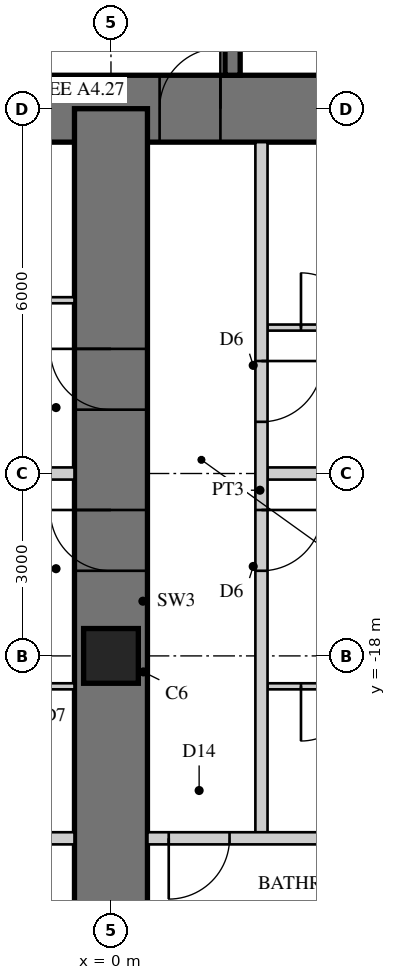
"""IFC4 building model, lengths in metres.
Left out: names, types, materials, properties, quantities, classifications, styles, units other than length and angle.
Written with IfcOpenShell. Run it as: python <this file> out.ifc"""

import sys

from ifc_helpers import new_model, si_unit, direction, frame, frame_2d, origin, origin_2d, place, context, subcontext, project, spatial, rectangle, extrude, element, fill, save


model = new_model("IFC4")
c1 = context("Model", 3, precision=1e-05, world=origin(), true_north=direction((0.0, 1.0)))
c2 = subcontext(c1, "Body", "Model", "MODEL_VIEW")
j1 = project(units=[si_unit("LENGTHUNIT", "METRE"), si_unit("PLANEANGLEUNIT", "RADIAN")], contexts=[c1])
p1 = place(None, origin())
s1 = spatial("IfcSite", under=j1, at=p1, CompositionType="ELEMENT")
p2 = place(p1, origin())
s2 = spatial("IfcBuilding", under=s1, at=p2, CompositionType="ELEMENT")
p3 = place(p2, frame((0.0, 0.0, 169.5)))
s3 = spatial("IfcBuildingStorey", under=s2, at=p3, CompositionType="ELEMENT", Elevation=169.5)
p4 = place(p3, frame((-9.0, -9.0, 0.0), z_axis=(0.0, 0.0, 1.0), x_axis=(1.0, 0.0, 0.0)))
e1 = element("IfcWall", 1, at=p4, inside=s3, PredefinedType="SHEAR", context=c2, shape_type="SweptSolid", body=[
    extrude(rectangle(XDim=18.0, YDim=1.1, at=frame_2d((9.0, 0.0))), origin(), (0.0, 0.0, 1.0), 3.4),
])
p5 = place(p4, frame((9.8, 0.0, 0.0)))
e2 = element("IfcOpeningElement", 2, at=p5, cuts=e1, PredefinedType="OPENING", context=c2, shape_type="SweptSolid", body=[
    extrude(rectangle(XDim=1.0, YDim=2.4, at=frame_2d((0.5, 1.2))), frame((0.0, 0.56, 0.0), z_axis=(0.0, -1.0, 0.0), x_axis=(1.0, 0.0, 0.0)), (0.0, 0.0, 1.0), 1.12),
])
p6 = place(p3, frame((2.0, -1.675, 0.0), z_axis=(0.0, 0.0, 1.0), x_axis=(0.0, -1.0, 0.0)))
e3 = element("IfcWall", 3, at=p6, inside=s3, PredefinedType="SHEAR", context=c2, shape_type="SweptSolid", body=[
    extrude(rectangle(XDim=6.775, YDim=0.25, at=frame_2d((3.387, 0.0))), origin(), (0.0, 0.0, 1.0), 3.4),
])
p7 = place(p6, frame((0.725, 0.0, 0.0)))
e4 = element("IfcOpeningElement", 4, at=p7, cuts=e3, PredefinedType="OPENING", context=c2, shape_type="SweptSolid", body=[
    extrude(rectangle(XDim=1.0, YDim=2.1, at=frame_2d((0.5, 1.05))), frame((0.0, 0.135, 0.0), z_axis=(0.0, -1.0, 0.0), x_axis=(1.0, 0.0, 0.0)), (0.0, 0.0, 1.0), 0.27),
])
p8 = place(p3, frame((0.0, -9.0, 0.0), z_axis=(0.0, 0.0, 1.0), x_axis=(0.0, -1.0, 0.0)))
e5 = element("IfcWall", 5, at=p8, inside=s3, PredefinedType="SHEAR", context=c2, shape_type="SweptSolid", body=[
    extrude(rectangle(XDim=18.0, YDim=1.2, at=frame_2d((9.0, 0.0))), origin(), (0.0, 0.0, 1.0), 3.4),
])
p9 = place(p8, frame((3.95, 0.0, 0.0)))
e6 = element("IfcOpeningElement", 6, at=p9, cuts=e5, PredefinedType="OPENING", context=c2, shape_type="SweptSolid", body=[
    extrude(rectangle(XDim=1.0, YDim=2.15, at=frame_2d((0.5, 1.075))), frame((0.0, 0.61, 0.0), z_axis=(0.0, -1.0, 0.0), x_axis=(1.0, 0.0, 0.0)), (0.0, 0.0, 1.0), 1.22),
])
p10 = place(p8, frame((6.6, 0.0, 0.0)))
e7 = element("IfcOpeningElement", 7, at=p10, cuts=e5, PredefinedType="OPENING", context=c2, shape_type="SweptSolid", body=[
    extrude(rectangle(XDim=1.0, YDim=2.15, at=frame_2d((0.5, 1.075))), frame((0.0, 0.61, 0.0), z_axis=(0.0, -1.0, 0.0), x_axis=(1.0, 0.0, 0.0)), (0.0, 0.0, 1.0), 1.22),
])
p11 = place(p8, frame((13.25, 0.0, 0.0)))
e8 = element("IfcOpeningElement", 8, at=p11, cuts=e5, PredefinedType="OPENING", context=c2, shape_type="SweptSolid", body=[
    extrude(rectangle(XDim=1.0, YDim=2.2, at=frame_2d((0.5, 1.1))), frame((0.0, 0.61, 0.0), z_axis=(0.0, -1.0, 0.0), x_axis=(1.0, 0.0, 0.0)), (0.0, 0.0, 1.0), 1.22),
])
p12 = place(p3, frame((0.0, -18.0, 0.0), z_axis=(0.0, 0.0, 1.0), x_axis=(1.0, 0.0, 0.0)))
e9 = element("IfcColumn", 9, at=p12, inside=s3, PredefinedType="COLUMN", context=c2, shape_type="SweptSolid", body=[
    extrude(rectangle(XDim=0.9, YDim=0.9, at=origin_2d()), origin(), (0.0, 0.0, 1.0), 3.4),
])
p13 = place(p3, frame((2.575, -12.6, 0.0), z_axis=(0.0, 0.0, 1.0), x_axis=(1.0, 0.0, 0.0)))
e10 = element("IfcWall", 10, at=p13, inside=s3, PredefinedType="PARTITIONING", context=c2, shape_type="SweptSolid", body=[
    extrude(rectangle(XDim=6.87, YDim=0.1, at=frame_2d((3.435, 0.0))), origin(), (0.0, 0.0, 1.0), 3.22),
])
p14 = place(p13, frame((0.55, 0.0, 0.0)))
e11 = element("IfcOpeningElement", 11, at=p14, cuts=e10, PredefinedType="OPENING", context=c2, shape_type="SweptSolid", body=[
    extrude(rectangle(XDim=0.9, YDim=2.1, at=frame_2d((0.45, 1.05))), frame((0.0, 0.06, 0.0), z_axis=(0.0, -1.0, 0.0), x_axis=(1.0, 0.0, 0.0)), (0.0, 0.0, 1.0), 0.12),
])
p15 = place(p13, frame((2.65, 0.0, 0.0)))
e12 = element("IfcOpeningElement", 12, at=p15, cuts=e10, PredefinedType="OPENING", context=c2, shape_type="SweptSolid", body=[
    extrude(rectangle(XDim=0.9, YDim=2.1, at=frame_2d((0.45, 1.05))), frame((0.0, 0.06, 0.0), z_axis=(0.0, -1.0, 0.0), x_axis=(1.0, 0.0, 0.0)), (0.0, 0.0, 1.0), 0.12),
])
p16 = place(p3, frame((-9.445, -12.15, 0.0), z_axis=(0.0, 0.0, 1.0), x_axis=(1.0, 0.0, 0.0)))
e13 = element("IfcWall", 13, at=p16, inside=s3, PredefinedType="PARTITIONING", context=c2, shape_type="SweptSolid", body=[
    extrude(rectangle(XDim=8.845, YDim=0.1, at=frame_2d((4.422, 0.0))), origin(), (0.0, 0.0, 1.0), 3.22),
])
p17 = place(p16, frame((5.295, 0.0, 0.0)))
e14 = element("IfcOpeningElement", 14, at=p17, cuts=e13, PredefinedType="OPENING", context=c2, shape_type="SweptSolid", body=[
    extrude(rectangle(XDim=0.9, YDim=2.1, at=frame_2d((0.45, 1.05))), frame((0.0, 0.06, 0.0), z_axis=(0.0, -1.0, 0.0), x_axis=(1.0, 0.0, 0.0)), (0.0, 0.0, 1.0), 0.12),
])
p18 = place(p16, frame((7.395, 0.0, 0.0)))
e15 = element("IfcOpeningElement", 15, at=p18, cuts=e13, PredefinedType="OPENING", context=c2, shape_type="SweptSolid", body=[
    extrude(rectangle(XDim=0.9, YDim=2.1, at=frame_2d((0.45, 1.05))), frame((0.0, 0.06, 0.0), z_axis=(0.0, -1.0, 0.0), x_axis=(1.0, 0.0, 0.0)), (0.0, 0.0, 1.0), 0.12),
])
p19 = place(p3, frame((2.575, -15.0, 0.0), z_axis=(0.0, 0.0, 1.0), x_axis=(1.0, 0.0, 0.0)))
e16 = element("IfcWall", 16, at=p19, inside=s3, PredefinedType="SOLIDWALL", context=c2, shape_type="SweptSolid", body=[
    extrude(rectangle(XDim=5.975, YDim=0.2, at=frame_2d((2.988, 0.0))), origin(), (0.0, 0.0, 1.0), 2.47),
])
p20 = place(p3, frame((-8.55, -15.0, 0.0), z_axis=(0.0, 0.0, 1.0), x_axis=(1.0, 0.0, 0.0)))
e17 = element("IfcWall", 17, at=p20, inside=s3, PredefinedType="SOLIDWALL", context=c2, shape_type="SweptSolid", body=[
    extrude(rectangle(XDim=7.95, YDim=0.2, at=frame_2d((3.975, 0.0))), origin(), (0.0, 0.0, 1.0), 2.47),
])
p21 = place(p3, frame((2.575, -18.5, 0.0), z_axis=(0.0, 0.0, 1.0), x_axis=(1.0, 0.0, 0.0)))
e18 = element("IfcWall", 18, at=p21, inside=s3, PredefinedType="PARTITIONING", context=c2, shape_type="SweptSolid", body=[
    extrude(rectangle(XDim=2.2, YDim=0.1, at=frame_2d((1.1, 0.0))), origin(), (0.0, 0.0, 1.0), 3.22),
])
p22 = place(p21, frame((0.55, 0.0, 0.0)))
e19 = element("IfcOpeningElement", 19, at=p22, cuts=e18, PredefinedType="OPENING", context=c2, shape_type="SweptSolid", body=[
    extrude(rectangle(XDim=0.9, YDim=2.1, at=frame_2d((0.45, 1.05))), frame((0.0, 0.06, 0.0), z_axis=(0.0, -1.0, 0.0), x_axis=(1.0, 0.0, 0.0)), (0.0, 0.0, 1.0), 0.12),
])
p23 = place(p3, frame((-2.8, -18.5, 0.0), z_axis=(0.0, 0.0, 1.0), x_axis=(1.0, 0.0, 0.0)))
e20 = element("IfcWall", 20, at=p23, inside=s3, PredefinedType="PARTITIONING", context=c2, shape_type="SweptSolid", body=[
    extrude(rectangle(XDim=2.2, YDim=0.1, at=frame_2d((1.1, 0.0))), origin(), (0.0, 0.0, 1.0), 3.22),
])
p24 = place(p23, frame((0.55, 0.0, 0.0)))
e21 = element("IfcOpeningElement", 21, at=p24, cuts=e20, PredefinedType="OPENING", context=c2, shape_type="SweptSolid", body=[
    extrude(rectangle(XDim=0.9, YDim=2.1, at=frame_2d((0.45, 1.05))), frame((0.0, 0.06, 0.0), z_axis=(0.0, -1.0, 0.0), x_axis=(1.0, 0.0, 0.0)), (0.0, 0.0, 1.0), 0.12),
])
p25 = place(p3, frame((2.475, -9.55, 0.0), z_axis=(0.0, 0.0, 1.0), x_axis=(0.0, -1.0, 0.0)))
e22 = element("IfcWall", 22, at=p25, inside=s3, PredefinedType="SOLIDWALL", context=c2, shape_type="SweptSolid", body=[
    extrude(rectangle(XDim=11.45, YDim=0.2, at=frame_2d((5.725, 0.0))), origin(), (0.0, 0.0, 1.0), 3.22),
])
p26 = place(p25, frame((3.6, 0.0, 0.0)))
e23 = element("IfcOpeningElement", 23, at=p26, cuts=e22, PredefinedType="OPENING", context=c2, shape_type="SweptSolid", body=[
    extrude(rectangle(XDim=1.0, YDim=2.15, at=frame_2d((0.5, 1.075))), frame((0.0, 0.11, 0.0), z_axis=(0.0, -1.0, 0.0), x_axis=(1.0, 0.0, 0.0)), (0.0, 0.0, 1.0), 0.22),
])
p27 = place(p25, frame((6.05, 0.0, 0.0)))
e24 = element("IfcOpeningElement", 24, at=p27, cuts=e22, PredefinedType="OPENING", context=c2, shape_type="SweptSolid", body=[
    extrude(rectangle(XDim=1.0, YDim=2.15, at=frame_2d((0.5, 1.075))), frame((0.0, 0.11, 0.0), z_axis=(0.0, -1.0, 0.0), x_axis=(1.0, 0.0, 0.0)), (0.0, 0.0, 1.0), 0.22),
])
p28 = place(p3, frame((-9.0, -21.0, 0.0), z_axis=(0.0, 0.0, 1.0), x_axis=(1.0, 0.0, 0.0)))
e25 = element("IfcWall", 25, at=p28, inside=s3, PredefinedType="SOLIDWALL", context=c2, shape_type="SweptSolid", body=[
    extrude(rectangle(XDim=8.4, YDim=0.2, at=frame_2d((4.2, 0.0))), origin(), (0.0, 0.0, 1.0), 2.62),
])
p29 = place(p3, frame((0.6, -21.0, 0.0), z_axis=(0.0, 0.0, 1.0), x_axis=(1.0, 0.0, 0.0)))
e26 = element("IfcWall", 26, at=p29, inside=s3, PredefinedType="SOLIDWALL", context=c2, shape_type="SweptSolid", body=[
    extrude(rectangle(XDim=8.4, YDim=0.2, at=frame_2d((4.2, 0.0))), origin(), (0.0, 0.0, 1.0), 2.62),
])
p30 = place(p29, frame((0.35, 0.0, 0.0)))
e27 = element("IfcOpeningElement", 27, at=p30, cuts=e26, PredefinedType="OPENING", context=c2, shape_type="SweptSolid", body=[
    extrude(rectangle(XDim=1.0, YDim=2.2, at=frame_2d((0.5, 1.1))), frame((0.0, 0.11, 0.0), z_axis=(0.0, -1.0, 0.0), x_axis=(1.0, 0.0, 0.0)), (0.0, 0.0, 1.0), 0.22),
])
p31 = place(p14, origin())
e28 = element("IfcDoor", 28, at=p31, inside=s3, OperationType="SINGLE_SWING_LEFT", PredefinedType="DOOR", context=c2, shape_type="SweptSolid", body=[
    extrude(rectangle(XDim=0.9, YDim=2.1, at=frame_2d((0.45, 1.05))), frame((0.0, 0.025, 0.0), z_axis=(0.0, -1.0, 0.0), x_axis=(1.0, 0.0, 0.0)), (0.0, 0.0, 1.0), 0.05),
])
fill(e11, e28)
p32 = place(p22, frame((0.9, 0.0, 0.0), z_axis=(0.0, 0.0, 1.0), x_axis=(-1.0, 0.0, 0.0)))
e29 = element("IfcDoor", 29, at=p32, inside=s3, OperationType="SINGLE_SWING_RIGHT", PredefinedType="DOOR", context=c2, shape_type="SweptSolid", body=[
    extrude(rectangle(XDim=0.9, YDim=2.1, at=frame_2d((0.45, 1.05))), frame((0.0, 0.025, 0.0), z_axis=(0.0, -1.0, 0.0), x_axis=(1.0, 0.0, 0.0)), (0.0, 0.0, 1.0), 0.05),
])
fill(e19, e29)
p33 = place(p26, origin())
e30 = element("IfcDoor", 30, at=p33, inside=s3, OperationType="SINGLE_SWING_LEFT", PredefinedType="DOOR", context=c2, shape_type="SweptSolid", body=[
    extrude(rectangle(XDim=1.0, YDim=2.15, at=frame_2d((0.5, 1.075))), frame((0.0, 0.025, 0.0), z_axis=(0.0, -1.0, 0.0), x_axis=(1.0, 0.0, 0.0)), (0.0, 0.0, 1.0), 0.05),
])
fill(e23, e30)
p34 = place(p27, origin())
e31 = element("IfcDoor", 31, at=p34, inside=s3, OperationType="SINGLE_SWING_LEFT", PredefinedType="DOOR", context=c2, shape_type="SweptSolid", body=[
    extrude(rectangle(XDim=1.0, YDim=2.15, at=frame_2d((0.5, 1.075))), frame((0.0, 0.025, 0.0), z_axis=(0.0, -1.0, 0.0), x_axis=(1.0, 0.0, 0.0)), (0.0, 0.0, 1.0), 0.05),
])
fill(e24, e31)
p35 = place(p30, frame((1.0, 0.0, 0.0), z_axis=(0.0, 0.0, 1.0), x_axis=(-1.0, 0.0, 0.0)))
e32 = element("IfcDoor", 32, at=p35, inside=s3, OperationType="SINGLE_SWING_RIGHT", PredefinedType="DOOR", context=c2, shape_type="SweptSolid", body=[
    extrude(rectangle(XDim=1.0, YDim=2.2, at=frame_2d((0.5, 1.1))), frame((0.0, 0.025, 0.0), z_axis=(0.0, -1.0, 0.0), x_axis=(1.0, 0.0, 0.0)), (0.0, 0.0, 1.0), 0.05),
])
fill(e27, e32)
p36 = place(p9, frame((1.0, 0.0, 0.0), z_axis=(0.0, 0.0, 1.0), x_axis=(-1.0, 0.0, 0.0)))
e33 = element("IfcDoor", 33, at=p36, inside=s3, OperationType="SINGLE_SWING_RIGHT", PredefinedType="DOOR", context=c2, shape_type="SweptSolid", body=[
    extrude(rectangle(XDim=1.0, YDim=2.15, at=frame_2d((0.5, 1.075))), frame((0.0, 0.025, 0.0), z_axis=(0.0, -1.0, 0.0), x_axis=(1.0, 0.0, 0.0)), (0.0, 0.0, 1.0), 0.05),
])
fill(e6, e33)
p37 = place(p10, frame((1.0, 0.0, 0.0), z_axis=(0.0, 0.0, 1.0), x_axis=(-1.0, 0.0, 0.0)))
e34 = element("IfcDoor", 34, at=p37, inside=s3, OperationType="SINGLE_SWING_RIGHT", PredefinedType="DOOR", context=c2, shape_type="SweptSolid", body=[
    extrude(rectangle(XDim=1.0, YDim=2.15, at=frame_2d((0.5, 1.075))), frame((0.0, 0.025, 0.0), z_axis=(0.0, -1.0, 0.0), x_axis=(1.0, 0.0, 0.0)), (0.0, 0.0, 1.0), 0.05),
])
fill(e7, e34)
p38 = place(p5, origin())
e35 = element("IfcDoor", 35, at=p38, inside=s3, OperationType="SINGLE_SWING_RIGHT", PredefinedType="DOOR", context=c2, shape_type="SweptSolid", body=[
    extrude(rectangle(XDim=1.0, YDim=2.4, at=frame_2d((0.5, 1.2))), frame((0.0, 0.055, 0.0), z_axis=(0.0, -1.0, 0.0), x_axis=(1.0, 0.0, 0.0)), (0.0, 0.0, 1.0), 0.05),
])
fill(e2, e35)
save(model, sys.argv[1])
